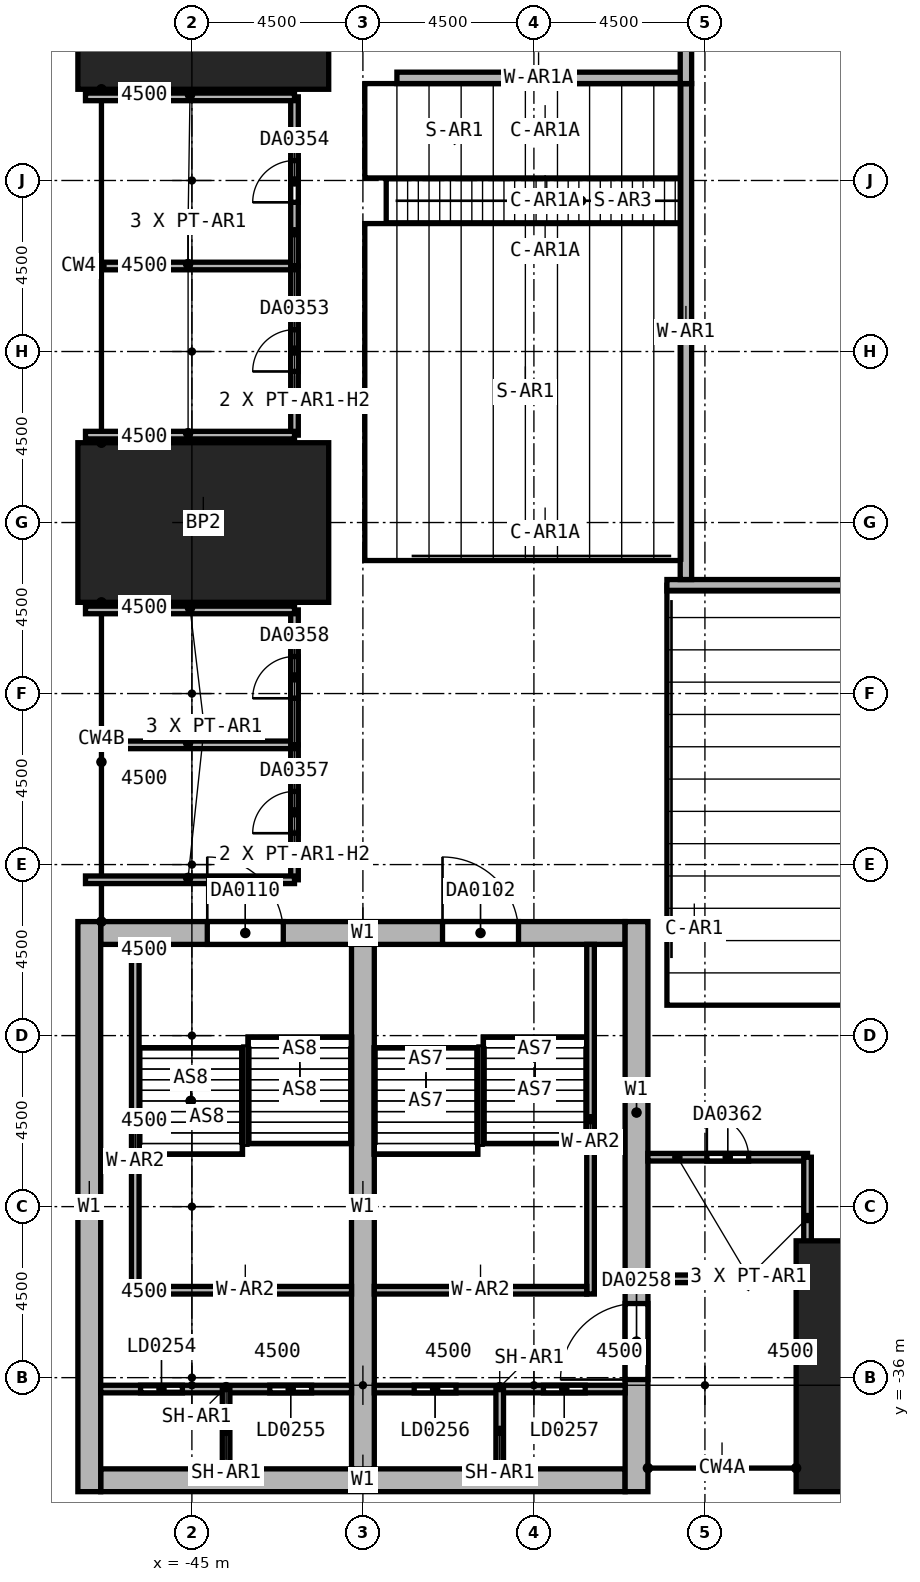
"""IFC4 building model, lengths in metres.
Left out: names, types, materials, properties, quantities, classifications, styles, units other than length and angle.
Written with IfcOpenShell. Run it as: python <this file> out.ifc"""

import sys

from ifc_helpers import new_model, si_unit, direction, frame, frame_2d, origin, origin_2d, place, context, subcontext, project, spatial, rectangle, hollow_rectangle, extrude, element, fill, save


model = new_model("IFC4")
c1 = context("Model", 3, precision=1e-05, world=origin(), true_north=direction((0.0, 1.0)))
c2 = subcontext(c1, "Body", "Model", "MODEL_VIEW")
j1 = project(units=[si_unit("LENGTHUNIT", "METRE"), si_unit("PLANEANGLEUNIT", "RADIAN")], contexts=[c1])
p1 = place(None, origin())
s1 = spatial("IfcSite", under=j1, at=p1, CompositionType="ELEMENT")
p2 = place(p1, origin())
s2 = spatial("IfcBuilding", under=s1, at=p2, CompositionType="ELEMENT")
p3 = place(p2, frame((0.0, 0.0, 12.0)))
s3 = spatial("IfcBuildingStorey", under=s2, at=p3, CompositionType="ELEMENT", Elevation=12.0)
for number, where, z_axis, x_axis in (
    (1, (-27.0, -35.7, 0.0), (0.0, 0.0, 1.0), (1.0, 0.0, 0.0)),
    (2, (-44.7, -13.5, 0.0), (0.0, 0.0, 1.0), (0.0, 1.0, 0.0)),
    (3, (-44.7, 0.0, 0.0), (0.0, 0.0, 1.0), (0.0, 1.0, 0.0)),
):
    element("IfcColumn", number, at=place(p3, frame(where, z_axis=z_axis, x_axis=x_axis)), inside=s3, PredefinedType="COLUMN", context=c2, shape_type="SweptSolid", body=[
        extrude(rectangle(XDim=4.2, YDim=6.6, at=origin_2d()), origin(), (0.0, 0.0, 1.0), 7.0),
    ])
p4 = place(p3, frame((-47.4, -24.3, 0.0), z_axis=(0.0, 0.0, 1.0), x_axis=(1.0, 0.0, 0.0)))
e4 = element("IfcWall", 4, at=p4, inside=s3, PredefinedType="SHEAR", context=c2, shape_type="SweptSolid", body=[
    extrude(rectangle(XDim=13.8, YDim=0.6, at=frame_2d((6.9, 0.0))), origin(), (0.0, 0.0, 1.0), 7.0),
])
p5 = place(p4, frame((8.995, 0.0, 0.0)))
e5 = element("IfcOpeningElement", 5, at=p5, cuts=e4, PredefinedType="OPENING", context=c2, shape_type="SweptSolid", body=[
    extrude(rectangle(XDim=2.0, YDim=2.4, at=frame_2d((1.0, 1.2))), frame((0.0, 0.3, 0.0), z_axis=(0.0, -1.0, 0.0), x_axis=(1.0, 0.0, 0.0)), (0.0, 0.0, 1.0), 0.6),
])
p6 = place(p4, frame((2.805, 0.0, 0.0)))
e6 = element("IfcOpeningElement", 6, at=p6, cuts=e4, PredefinedType="OPENING", context=c2, shape_type="SweptSolid", body=[
    extrude(rectangle(XDim=2.0, YDim=2.4, at=frame_2d((1.0, 1.2))), frame((0.0, 0.3, 0.0), z_axis=(0.0, -1.0, 0.0), x_axis=(1.0, 0.0, 0.0)), (0.0, 0.0, 1.0), 0.6),
])
p7 = place(p3, frame((-47.4, -38.7, 0.0), z_axis=(0.0, 0.0, 1.0), x_axis=(1.0, 0.0, 0.0)))
e7 = element("IfcWall", 7, at=p7, inside=s3, PredefinedType="SHEAR", context=c2, shape_type="SweptSolid", body=[
    extrude(rectangle(XDim=13.8, YDim=0.6, at=frame_2d((6.9, 0.0))), origin(), (0.0, 0.0, 1.0), 7.0),
])
p8 = place(p3, frame((-47.7, -39.0, 0.0), z_axis=(0.0, 0.0, 1.0), x_axis=(0.0, 1.0, 0.0)))
e8 = element("IfcWall", 8, at=p8, inside=s3, PredefinedType="SHEAR", context=c2, shape_type="SweptSolid", body=[
    extrude(rectangle(XDim=15.0, YDim=0.6, at=frame_2d((7.5, 0.0))), origin(), (0.0, 0.0, 1.0), 7.0),
])
p9 = place(p3, frame((-33.3, -39.0, 0.0), z_axis=(0.0, 0.0, 1.0), x_axis=(0.0, 1.0, 0.0)))
e9 = element("IfcWall", 9, at=p9, inside=s3, PredefinedType="SHEAR", context=c2, shape_type="SweptSolid", body=[
    extrude(rectangle(XDim=15.0, YDim=0.6, at=frame_2d((7.5, 0.0))), origin(), (0.0, 0.0, 1.0), 7.0),
])
p10 = place(p9, frame((2.95, 0.0, 0.0)))
e10 = element("IfcOpeningElement", 10, at=p10, cuts=e9, PredefinedType="OPENING", context=c2, shape_type="SweptSolid", body=[
    extrude(rectangle(XDim=2.0, YDim=2.4, at=frame_2d((1.0, 1.2))), frame((0.0, 0.3, 0.0), z_axis=(0.0, -1.0, 0.0), x_axis=(1.0, 0.0, 0.0)), (0.0, 0.0, 1.0), 0.6),
])
p11 = place(p3, frame((-40.5, -38.4, 0.0), z_axis=(0.0, 0.0, 1.0), x_axis=(0.0, 1.0, 0.0)))
e11 = element("IfcWall", 11, at=p11, inside=s3, PredefinedType="SHEAR", context=c2, shape_type="SweptSolid", body=[
    extrude(rectangle(XDim=13.8, YDim=0.6, at=frame_2d((6.9, 0.0))), origin(), (0.0, 0.0, 1.0), 7.0),
])
p12 = place(p3, frame((32.5, -15.15, 0.0), z_axis=(0.0, 0.0, 1.0), x_axis=(-1.0, 0.0, 0.0)))
e12 = element("IfcWall", 12, at=p12, inside=s3, PredefinedType="SOLIDWALL", context=c2, shape_type="SweptSolid", body=[
    extrude(rectangle(XDim=65.0, YDim=0.3, at=frame_2d((32.5, 0.0))), origin(), (0.0, 0.0, 1.0), 2.125),
])
p13 = place(p3, frame((-32.0, -1.95, 0.0), z_axis=(0.0, 0.0, 1.0), x_axis=(0.0, -1.0, 0.0)))
e13 = element("IfcWall", 13, at=p13, inside=s3, PredefinedType="SOLIDWALL", context=c2, shape_type="SweptSolid", body=[
    extrude(rectangle(XDim=13.05, YDim=0.3, at=frame_2d((6.525, 0.0))), origin(), (0.0, 0.0, 1.0), 2.0),
])
p14 = place(p3, frame((-32.0, -1.8, 0.0), z_axis=(0.0, 0.0, 1.0), x_axis=(-1.0, 0.0, 0.0)))
e14 = element("IfcWall", 14, at=p14, inside=s3, PredefinedType="SOLIDWALL", context=c2, shape_type="SweptSolid", body=[
    extrude(rectangle(XDim=7.605, YDim=0.3, at=frame_2d((3.802, 0.0))), origin(), (0.0, 0.0, 1.0), 7.0),
])
p15 = place(p3, frame((-31.78, -24.2, 0.0), z_axis=(0.0, 0.0, 1.0), x_axis=(1.0, 0.0, 0.0)))
e15 = element("IfcColumn", 15, at=p15, inside=s3, PredefinedType="COLUMN", context=c2, shape_type="SweptSolid", body=[
    extrude(hollow_rectangle(XDim=0.5, YDim=0.6, WallThickness=0.03, at=origin_2d()), origin(), (0.0, 0.0, 1.0), 5.712),
])
for number, where, z_axis, x_axis in (
    (16, (-35.705, -3.192, 0.0), (0.0, 0.0, 1.0), (1.0, 0.0, 0.0)),
    (17, (-35.705, -6.353, 0.0), (0.0, 0.0, 1.0), (1.0, 0.0, 0.0)),
    (18, (-35.705, -13.78, 0.0), (0.0, 0.0, 1.0), (1.0, 0.0, 0.0)),
    (19, (-35.705, -5.033, 0.0), (0.0, 0.0, 1.0), (1.0, 0.0, 0.0)),
):
    element("IfcColumn", number, at=place(p3, frame(where, z_axis=z_axis, x_axis=x_axis)), inside=s3, PredefinedType="COLUMN", context=c2, shape_type="SweptSolid", body=[
        extrude(hollow_rectangle(XDim=0.5, YDim=0.6, WallThickness=0.03, at=origin_2d()), origin(), (0.0, 0.0, 1.0), 3.724),
    ])
p16 = place(p3, frame((-34.51, -33.8, 0.0), z_axis=(0.0, 0.0, 1.0), x_axis=(0.0, 1.0, 0.0)))
e20 = element("IfcWall", 20, at=p16, inside=s3, PredefinedType="SOLIDWALL", context=c2, shape_type="SweptSolid", body=[
    extrude(rectangle(XDim=9.2, YDim=0.2, at=frame_2d((4.6, 0.0))), origin(), (0.0, 0.0, 1.0), 7.0),
])
p17 = place(p3, frame((-40.2, -33.7, 0.0), z_axis=(0.0, 0.0, 1.0), x_axis=(1.0, 0.0, 0.0)))
e21 = element("IfcWall", 21, at=p17, inside=s3, PredefinedType="SOLIDWALL", context=c2, shape_type="SweptSolid", body=[
    extrude(rectangle(XDim=5.59, YDim=0.2, at=frame_2d((2.795, 0.0))), origin(), (0.0, 0.0, 1.0), 7.0),
])
p18 = place(p3, frame((-46.49, -33.8, 0.0), z_axis=(0.0, 0.0, 1.0), x_axis=(0.0, 1.0, 0.0)))
e22 = element("IfcWall", 22, at=p18, inside=s3, PredefinedType="SOLIDWALL", context=c2, shape_type="SweptSolid", body=[
    extrude(rectangle(XDim=9.2, YDim=0.2, at=frame_2d((4.6, 0.0))), origin(), (0.0, 0.0, 1.0), 7.0),
])
p19 = place(p3, frame((-46.39, -33.7, 0.0), z_axis=(0.0, 0.0, 1.0), x_axis=(1.0, 0.0, 0.0)))
e23 = element("IfcWall", 23, at=p19, inside=s3, PredefinedType="SOLIDWALL", context=c2, shape_type="SweptSolid", body=[
    extrude(rectangle(XDim=5.59, YDim=0.2, at=frame_2d((2.795, 0.0))), origin(), (0.0, 0.0, 1.0), 7.0),
])
p20 = place(p3, frame((-47.4, -36.3, 0.0), z_axis=(0.0, 0.0, 1.0), x_axis=(1.0, 0.0, 0.0)))
e24 = element("IfcWall", 24, at=p20, inside=s3, PredefinedType="SHEAR", context=c2, shape_type="SweptSolid", body=[
    extrude(rectangle(XDim=6.6, YDim=0.2, at=frame_2d((3.3, 0.0))), origin(), (0.0, 0.0, 1.0), 7.0),
])
p21 = place(p20, frame((1.05, 0.0, 0.0)))
e25 = element("IfcOpeningElement", 25, at=p21, cuts=e24, PredefinedType="OPENING", context=c2, shape_type="SweptSolid", body=[
    extrude(rectangle(XDim=1.1, YDim=2.4, at=frame_2d((0.55, 1.2))), frame((0.0, 0.1, 0.0), z_axis=(0.0, -1.0, 0.0), x_axis=(1.0, 0.0, 0.0)), (0.0, 0.0, 1.0), 0.2),
])
p22 = place(p20, frame((4.45, 0.0, 0.0)))
e26 = element("IfcOpeningElement", 26, at=p22, cuts=e24, PredefinedType="OPENING", context=c2, shape_type="SweptSolid", body=[
    extrude(rectangle(XDim=1.1, YDim=2.4, at=frame_2d((0.55, 1.2))), frame((0.0, 0.1, 0.0), z_axis=(0.0, -1.0, 0.0), x_axis=(1.0, 0.0, 0.0)), (0.0, 0.0, 1.0), 0.2),
])
p23 = place(p3, frame((-40.2, -36.3, 0.0), z_axis=(0.0, 0.0, 1.0), x_axis=(1.0, 0.0, 0.0)))
e27 = element("IfcWall", 27, at=p23, inside=s3, PredefinedType="SHEAR", context=c2, shape_type="SweptSolid", body=[
    extrude(rectangle(XDim=6.6, YDim=0.2, at=frame_2d((3.3, 0.0))), origin(), (0.0, 0.0, 1.0), 7.0),
])
p24 = place(p23, frame((1.05, 0.0, 0.0)))
e28 = element("IfcOpeningElement", 28, at=p24, cuts=e27, PredefinedType="OPENING", context=c2, shape_type="SweptSolid", body=[
    extrude(rectangle(XDim=1.1, YDim=2.4, at=frame_2d((0.55, 1.2))), frame((0.0, 0.1, 0.0), z_axis=(0.0, -1.0, 0.0), x_axis=(1.0, 0.0, 0.0)), (0.0, 0.0, 1.0), 0.2),
])
p25 = place(p23, frame((4.45, 0.0, 0.0)))
e29 = element("IfcOpeningElement", 29, at=p25, cuts=e27, PredefinedType="OPENING", context=c2, shape_type="SweptSolid", body=[
    extrude(rectangle(XDim=1.1, YDim=2.4, at=frame_2d((0.55, 1.2))), frame((0.0, 0.1, 0.0), z_axis=(0.0, -1.0, 0.0), x_axis=(1.0, 0.0, 0.0)), (0.0, 0.0, 1.0), 0.2),
])
for number, where, z_axis, x_axis in (
    (30, (-36.9, -38.4, 0.0), (0.0, 0.0, 1.0), (0.0, 1.0, 0.0)),
    (31, (-44.1, -38.4, 0.0), (0.0, 0.0, 1.0), (0.0, 1.0, 0.0)),
):
    element("IfcWall", number, at=place(p3, frame(where, z_axis=z_axis, x_axis=x_axis)), inside=s3, PredefinedType="SHEAR", context=c2, shape_type="SweptSolid", body=[
        extrude(rectangle(XDim=2.1, YDim=0.2, at=frame_2d((1.05, 0.0))), origin(), (0.0, 0.0, 1.0), 7.0),
    ])
p26 = place(p3, frame((-42.3, -11.2, 0.0), z_axis=(0.0, 0.0, 1.0), x_axis=(0.0, 1.0, 0.0)))
e32 = element("IfcWall", 32, at=p26, inside=s3, PredefinedType="PARTITIONING", context=c2, shape_type="SweptSolid", body=[
    extrude(rectangle(XDim=4.45, YDim=0.2, at=frame_2d((2.225, 0.0))), origin(), (0.0, 0.0, 1.0), 5.5),
])
p27 = place(p26, frame((1.675, 0.0, 0.0)))
e33 = element("IfcOpeningElement", 33, at=p27, cuts=e32, PredefinedType="OPENING", context=c2, shape_type="SweptSolid", body=[
    extrude(rectangle(XDim=1.1, YDim=2.4, at=frame_2d((0.55, 1.2))), frame((0.0, 0.1, 0.0), z_axis=(0.0, -1.0, 0.0), x_axis=(1.0, 0.0, 0.0)), (0.0, 0.0, 1.0), 0.2),
])
for number, where, z_axis, x_axis in (
    (34, (-42.3, -11.2, 0.0), (0.0, 0.0, 1.0), (-1.0, 0.0, 0.0)),
    (35, (-47.8, -6.75, 0.0), (0.0, 0.0, 1.0), (1.0, 0.0, 0.0)),
):
    element("IfcWall", number, at=place(p3, frame(where, z_axis=z_axis, x_axis=x_axis)), inside=s3, PredefinedType="PARTITIONING", context=c2, shape_type="SweptSolid", body=[
        extrude(rectangle(XDim=5.5, YDim=0.2, at=frame_2d((2.75, 0.0))), origin(), (0.0, 0.0, 1.0), 6.7),
    ])
p28 = place(p3, frame((-42.3, -6.75, 0.0), z_axis=(0.0, 0.0, 1.0), x_axis=(0.0, 1.0, 0.0)))
e36 = element("IfcWall", 36, at=p28, inside=s3, PredefinedType="PARTITIONING", context=c2, shape_type="SweptSolid", body=[
    extrude(rectangle(XDim=4.45, YDim=0.2, at=frame_2d((2.225, 0.0))), origin(), (0.0, 0.0, 1.0), 5.5),
])
p29 = place(p28, frame((1.675, 0.0, 0.0)))
e37 = element("IfcOpeningElement", 37, at=p29, cuts=e36, PredefinedType="OPENING", context=c2, shape_type="SweptSolid", body=[
    extrude(rectangle(XDim=1.1, YDim=2.4, at=frame_2d((0.55, 1.2))), frame((0.0, 0.1, 0.0), z_axis=(0.0, -1.0, 0.0), x_axis=(1.0, 0.0, 0.0)), (0.0, 0.0, 1.0), 0.2),
])
p30 = place(p3, frame((-42.3, -2.3, 0.0), z_axis=(0.0, 0.0, 1.0), x_axis=(-1.0, 0.0, 0.0)))
e38 = element("IfcWall", 38, at=p30, inside=s3, PredefinedType="PARTITIONING", context=c2, shape_type="SweptSolid", body=[
    extrude(rectangle(XDim=5.5, YDim=0.2, at=frame_2d((2.75, 0.0))), origin(), (0.0, 0.0, 1.0), 6.7),
])
p31 = place(p3, frame((-42.3, -22.9, 0.0), z_axis=(0.0, 0.0, 1.0), x_axis=(0.0, 1.0, 0.0)))
e39 = element("IfcWall", 39, at=p31, inside=s3, PredefinedType="PARTITIONING", context=c2, shape_type="SweptSolid", body=[
    extrude(rectangle(XDim=3.55, YDim=0.2, at=frame_2d((1.775, 0.0))), origin(), (0.0, 0.0, 1.0), 5.5),
])
p32 = place(p31, frame((1.225, 0.0, 0.0)))
e40 = element("IfcOpeningElement", 40, at=p32, cuts=e39, PredefinedType="OPENING", context=c2, shape_type="SweptSolid", body=[
    extrude(rectangle(XDim=1.1, YDim=2.4, at=frame_2d((0.55, 1.2))), frame((0.0, 0.1, 0.0), z_axis=(0.0, -1.0, 0.0), x_axis=(1.0, 0.0, 0.0)), (0.0, 0.0, 1.0), 0.2),
])
for number, where, z_axis, x_axis in (
    (41, (-42.3, -22.9, 0.0), (0.0, 0.0, 1.0), (-1.0, 0.0, 0.0)),
    (42, (-47.8, -19.35, 0.0), (0.0, 0.0, 1.0), (1.0, 0.0, 0.0)),
):
    element("IfcWall", number, at=place(p3, frame(where, z_axis=z_axis, x_axis=x_axis)), inside=s3, PredefinedType="PARTITIONING", context=c2, shape_type="SweptSolid", body=[
        extrude(rectangle(XDim=5.5, YDim=0.2, at=frame_2d((2.75, 0.0))), origin(), (0.0, 0.0, 1.0), 6.7),
    ])
p33 = place(p3, frame((-42.3, -19.35, 0.0), z_axis=(0.0, 0.0, 1.0), x_axis=(0.0, 1.0, 0.0)))
e43 = element("IfcWall", 43, at=p33, inside=s3, PredefinedType="PARTITIONING", context=c2, shape_type="SweptSolid", body=[
    extrude(rectangle(XDim=3.55, YDim=0.2, at=frame_2d((1.775, 0.0))), origin(), (0.0, 0.0, 1.0), 5.5),
])
p34 = place(p33, frame((1.225, 0.0, 0.0)))
e44 = element("IfcOpeningElement", 44, at=p34, cuts=e43, PredefinedType="OPENING", context=c2, shape_type="SweptSolid", body=[
    extrude(rectangle(XDim=1.1, YDim=2.4, at=frame_2d((0.55, 1.2))), frame((0.0, 0.1, 0.0), z_axis=(0.0, -1.0, 0.0), x_axis=(1.0, 0.0, 0.0)), (0.0, 0.0, 1.0), 0.2),
])
p35 = place(p3, frame((-42.3, -15.8, 0.0), z_axis=(0.0, 0.0, 1.0), x_axis=(-1.0, 0.0, 0.0)))
e45 = element("IfcWall", 45, at=p35, inside=s3, PredefinedType="PARTITIONING", context=c2, shape_type="SweptSolid", body=[
    extrude(rectangle(XDim=5.5, YDim=0.2, at=frame_2d((2.75, 0.0))), origin(), (0.0, 0.0, 1.0), 6.7),
])
p36 = place(p3, frame((-33.0, -30.2, 0.0), z_axis=(0.0, 0.0, 1.0), x_axis=(1.0, 0.0, 0.0)))
e46 = element("IfcWall", 46, at=p36, inside=s3, PredefinedType="PARTITIONING", context=c2, shape_type="SweptSolid", body=[
    extrude(rectangle(XDim=4.2, YDim=0.2, at=frame_2d((2.1, 0.0))), origin(), (0.0, 0.0, 1.0), 6.7),
])
p37 = place(p36, frame((1.55, 0.0, 0.0)))
e47 = element("IfcOpeningElement", 47, at=p37, cuts=e46, PredefinedType="OPENING", context=c2, shape_type="SweptSolid", body=[
    extrude(rectangle(XDim=1.1, YDim=2.4, at=frame_2d((0.55, 1.2))), frame((0.0, 0.1, 0.0), z_axis=(0.0, -1.0, 0.0), x_axis=(1.0, 0.0, 0.0)), (0.0, 0.0, 1.0), 0.2),
])
p38 = place(p3, frame((-28.8, -33.4, 0.0), z_axis=(0.0, 0.0, 1.0), x_axis=(0.0, 1.0, 0.0)))
e48 = element("IfcWall", 48, at=p38, inside=s3, PredefinedType="PARTITIONING", context=c2, shape_type="SweptSolid", body=[
    extrude(rectangle(XDim=3.2, YDim=0.2, at=frame_2d((1.6, 0.0))), origin(), (0.0, 0.0, 1.0), 6.7),
])
p39 = place(p3, frame((-33.0, -33.4, 0.0), z_axis=(0.0, 0.0, 1.0), x_axis=(1.0, 0.0, 0.0)))
e49 = element("IfcWall", 49, at=p39, inside=s3, PredefinedType="PARTITIONING", context=c2, shape_type="SweptSolid", body=[
    extrude(rectangle(XDim=4.2, YDim=0.2, at=frame_2d((2.1, 0.0))), origin(), (0.0, 0.0, 1.0), 6.7),
])
p40 = place(p3, frame((-32.0, 1.95, 0.0), z_axis=(0.0, 0.0, 1.0), x_axis=(0.0, -1.0, 0.0)))
e50 = element("IfcWall", 50, at=p40, inside=s3, PredefinedType="PARTITIONING", context=c2, shape_type="SweptSolid", body=[
    extrude(rectangle(XDim=3.9, YDim=0.3, at=frame_2d((1.95, 0.0))), origin(), (0.0, 0.0, 1.0), 2.7),
])
p41 = place(p40, frame((0.95, 0.0, 0.0)))
e51 = element("IfcOpeningElement", 51, at=p41, cuts=e50, PredefinedType="OPENING", context=c2, shape_type="SweptSolid", body=[
    extrude(rectangle(XDim=2.0, YDim=2.4, at=frame_2d((1.0, 1.2))), frame((0.0, 0.15, 0.0), z_axis=(0.0, -1.0, 0.0), x_axis=(1.0, 0.0, 0.0)), (0.0, 0.0, 1.0), 0.3),
])
p42 = place(p5, frame((2.0, 0.0, 0.0), z_axis=(0.0, 0.0, 1.0), x_axis=(-1.0, 0.0, 0.0)))
e52 = element("IfcDoor", 52, at=p42, inside=s3, OperationType="DOUBLE_DOOR_SINGLE_SWING", PredefinedType="DOOR", context=c2, shape_type="SweptSolid", body=[
    extrude(rectangle(XDim=2.0, YDim=2.4, at=frame_2d((1.0, 1.2))), frame((0.0, 0.025, 0.0), z_axis=(0.0, -1.0, 0.0), x_axis=(1.0, 0.0, 0.0)), (0.0, 0.0, 1.0), 0.05),
])
fill(e5, e52)
p43 = place(p6, frame((2.0, 0.0, 0.0), z_axis=(0.0, 0.0, 1.0), x_axis=(-1.0, 0.0, 0.0)))
e53 = element("IfcDoor", 53, at=p43, inside=s3, OperationType="DOUBLE_DOOR_SINGLE_SWING", PredefinedType="DOOR", context=c2, shape_type="SweptSolid", body=[
    extrude(rectangle(XDim=2.0, YDim=2.4, at=frame_2d((1.0, 1.2))), frame((0.0, 0.025, 0.0), z_axis=(0.0, -1.0, 0.0), x_axis=(1.0, 0.0, 0.0)), (0.0, 0.0, 1.0), 0.05),
])
fill(e6, e53)
p44 = place(p21, frame((1.1, 0.0, 0.0), z_axis=(0.0, 0.0, 1.0), x_axis=(-1.0, 0.0, 0.0)))
e54 = element("IfcDoor", 54, at=p44, inside=s3, OperationType="DOUBLE_DOOR_SLIDING", PredefinedType="DOOR", context=c2, shape_type="SweptSolid", body=[
    extrude(rectangle(XDim=1.1, YDim=2.4, at=frame_2d((0.55, 1.2))), frame((0.0, 0.025, 0.0), z_axis=(0.0, -1.0, 0.0), x_axis=(1.0, 0.0, 0.0)), (0.0, 0.0, 1.0), 0.05),
])
fill(e25, e54)
p45 = place(p22, frame((1.1, 0.0, 0.0), z_axis=(0.0, 0.0, 1.0), x_axis=(-1.0, 0.0, 0.0)))
e55 = element("IfcDoor", 55, at=p45, inside=s3, OperationType="DOUBLE_DOOR_SLIDING", PredefinedType="DOOR", context=c2, shape_type="SweptSolid", body=[
    extrude(rectangle(XDim=1.1, YDim=2.4, at=frame_2d((0.55, 1.2))), frame((0.0, 0.025, 0.0), z_axis=(0.0, -1.0, 0.0), x_axis=(1.0, 0.0, 0.0)), (0.0, 0.0, 1.0), 0.05),
])
fill(e26, e55)
p46 = place(p24, frame((1.1, 0.0, 0.0), z_axis=(0.0, 0.0, 1.0), x_axis=(-1.0, 0.0, 0.0)))
e56 = element("IfcDoor", 56, at=p46, inside=s3, OperationType="DOUBLE_DOOR_SLIDING", PredefinedType="DOOR", context=c2, shape_type="SweptSolid", body=[
    extrude(rectangle(XDim=1.1, YDim=2.4, at=frame_2d((0.55, 1.2))), frame((0.0, 0.025, 0.0), z_axis=(0.0, -1.0, 0.0), x_axis=(1.0, 0.0, 0.0)), (0.0, 0.0, 1.0), 0.05),
])
fill(e28, e56)
p47 = place(p25, frame((1.1, 0.0, 0.0), z_axis=(0.0, 0.0, 1.0), x_axis=(-1.0, 0.0, 0.0)))
e57 = element("IfcDoor", 57, at=p47, inside=s3, OperationType="DOUBLE_DOOR_SLIDING", PredefinedType="DOOR", context=c2, shape_type="SweptSolid", body=[
    extrude(rectangle(XDim=1.1, YDim=2.4, at=frame_2d((0.55, 1.2))), frame((0.0, 0.025, 0.0), z_axis=(0.0, -1.0, 0.0), x_axis=(1.0, 0.0, 0.0)), (0.0, 0.0, 1.0), 0.05),
])
fill(e29, e57)
p48 = place(p10, origin())
e58 = element("IfcDoor", 58, at=p48, inside=s3, OperationType="DOUBLE_DOOR_SINGLE_SWING", PredefinedType="DOOR", context=c2, shape_type="SweptSolid", body=[
    extrude(rectangle(XDim=2.0, YDim=2.4, at=frame_2d((1.0, 1.2))), frame((0.0, 0.025, 0.0), z_axis=(0.0, -1.0, 0.0), x_axis=(1.0, 0.0, 0.0)), (0.0, 0.0, 1.0), 0.05),
])
fill(e10, e58)
p49 = place(p27, origin())
e59 = element("IfcDoor", 59, at=p49, inside=s3, OperationType="DOUBLE_DOOR_SINGLE_SWING", PredefinedType="DOOR", context=c2, shape_type="SweptSolid", body=[
    extrude(rectangle(XDim=1.1, YDim=2.4, at=frame_2d((0.55, 1.2))), frame((0.0, 0.025, 0.0), z_axis=(0.0, -1.0, 0.0), x_axis=(1.0, 0.0, 0.0)), (0.0, 0.0, 1.0), 0.05),
])
fill(e33, e59)
p50 = place(p29, origin())
e60 = element("IfcDoor", 60, at=p50, inside=s3, OperationType="DOUBLE_DOOR_SINGLE_SWING", PredefinedType="DOOR", context=c2, shape_type="SweptSolid", body=[
    extrude(rectangle(XDim=1.1, YDim=2.4, at=frame_2d((0.55, 1.2))), frame((0.0, 0.025, 0.0), z_axis=(0.0, -1.0, 0.0), x_axis=(1.0, 0.0, 0.0)), (0.0, 0.0, 1.0), 0.05),
])
fill(e37, e60)
p51 = place(p32, origin())
e61 = element("IfcDoor", 61, at=p51, inside=s3, OperationType="DOUBLE_DOOR_SINGLE_SWING", PredefinedType="DOOR", context=c2, shape_type="SweptSolid", body=[
    extrude(rectangle(XDim=1.1, YDim=2.4, at=frame_2d((0.55, 1.2))), frame((0.0, 0.025, 0.0), z_axis=(0.0, -1.0, 0.0), x_axis=(1.0, 0.0, 0.0)), (0.0, 0.0, 1.0), 0.05),
])
fill(e40, e61)
p52 = place(p34, origin())
e62 = element("IfcDoor", 62, at=p52, inside=s3, OperationType="DOUBLE_DOOR_SINGLE_SWING", PredefinedType="DOOR", context=c2, shape_type="SweptSolid", body=[
    extrude(rectangle(XDim=1.1, YDim=2.4, at=frame_2d((0.55, 1.2))), frame((0.0, 0.025, 0.0), z_axis=(0.0, -1.0, 0.0), x_axis=(1.0, 0.0, 0.0)), (0.0, 0.0, 1.0), 0.05),
])
fill(e44, e62)
p53 = place(p37, origin())
e63 = element("IfcDoor", 63, at=p53, inside=s3, OperationType="DOUBLE_DOOR_SINGLE_SWING", PredefinedType="DOOR", context=c2, shape_type="SweptSolid", body=[
    extrude(rectangle(XDim=1.1, YDim=2.4, at=frame_2d((0.55, 1.2))), frame((0.0, 0.025, 0.0), z_axis=(0.0, -1.0, 0.0), x_axis=(1.0, 0.0, 0.0)), (0.0, 0.0, 1.0), 0.05),
])
fill(e47, e63)
save(model, sys.argv[1])
